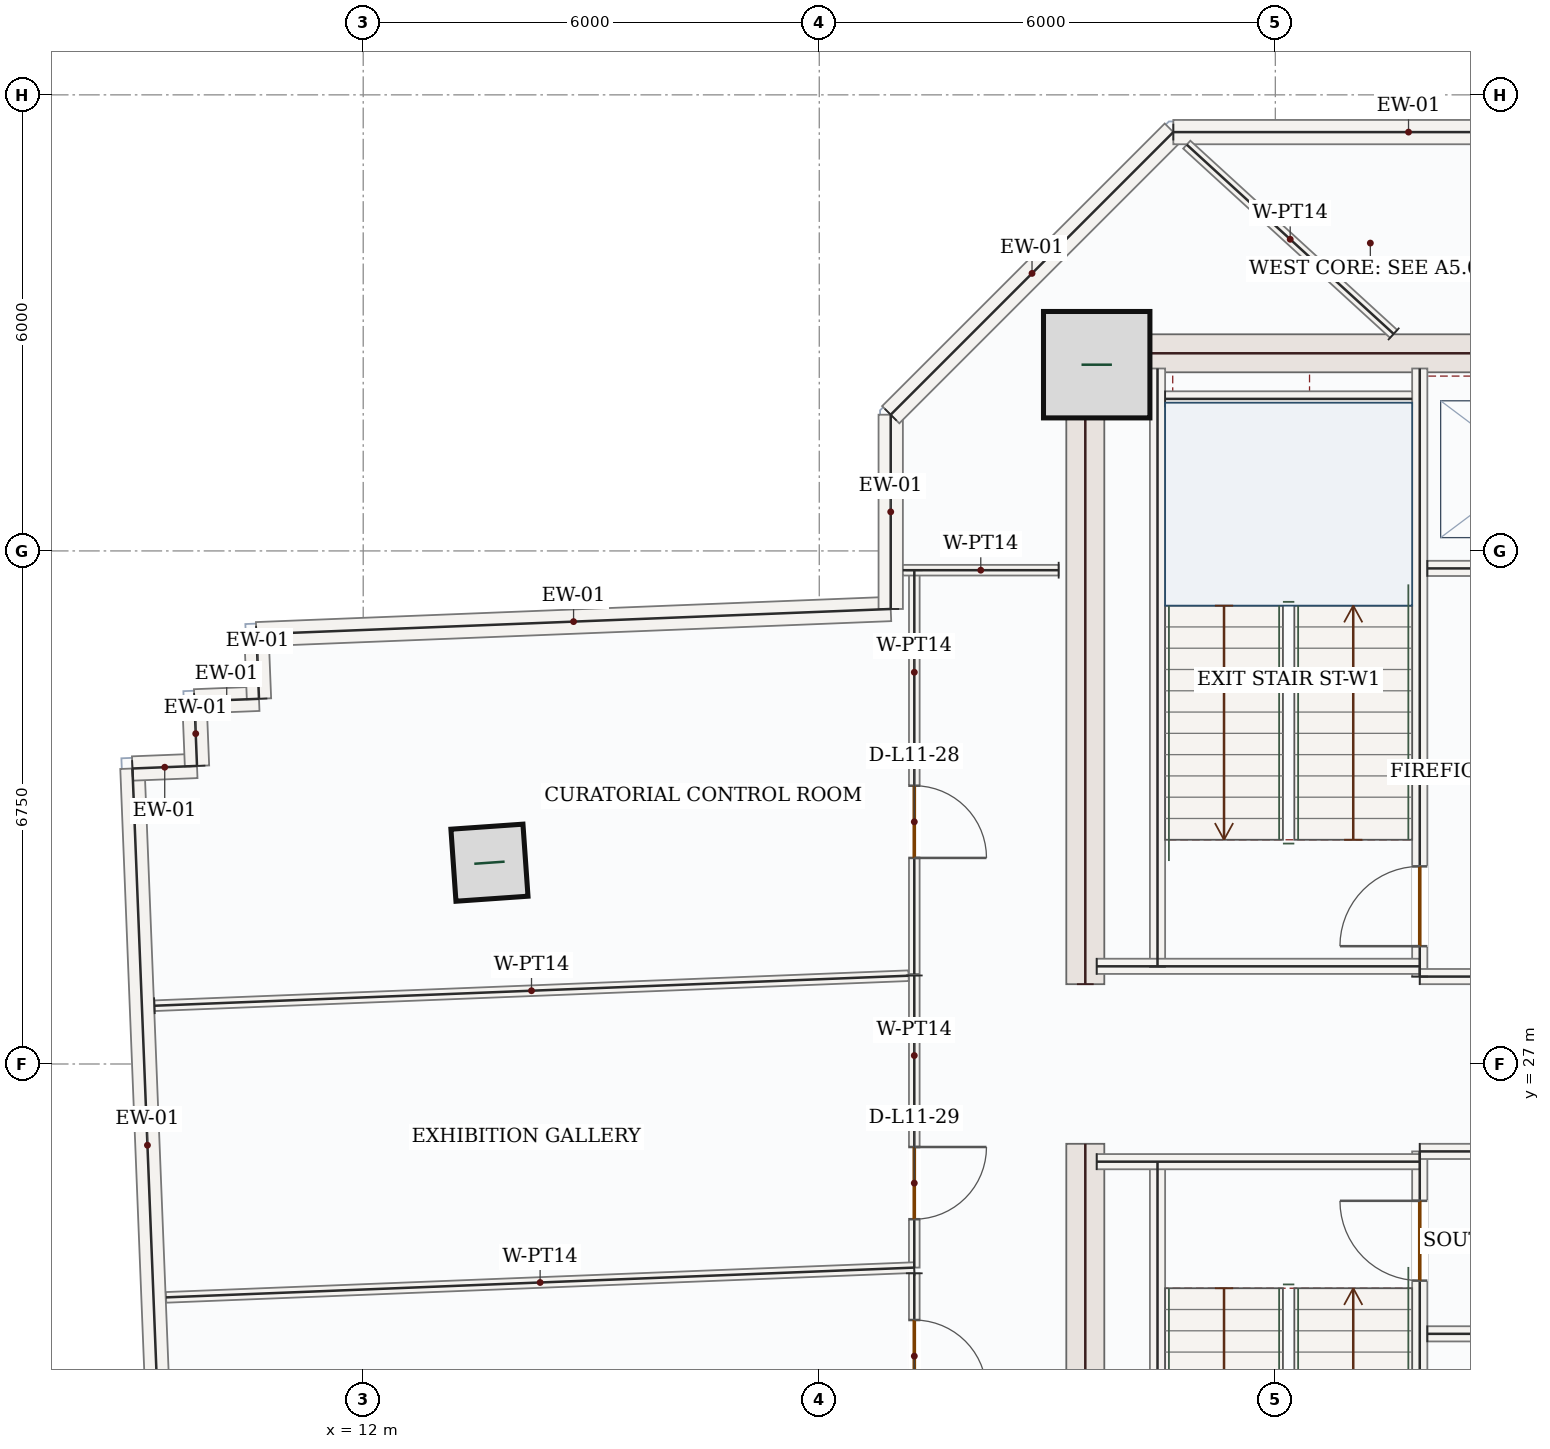
"""IFC4 building model, lengths in metres.
Left out: names, types, materials, properties, quantities, classifications, styles, units other than length and angle.
Written with IfcOpenShell. Run it as: python <this file> out.ifc"""

import sys

from ifc_helpers import new_model, si_unit, direction, frame, frame_2d, origin, origin_2d, place, context, subcontext, project, spatial, rectangle, hollow_rectangle, extrude, source, transform, mapped, element, fill, save


model = new_model("IFC4")
c1 = context("Model", 3, precision=1e-05, world=origin(), true_north=direction((0.0, 1.0)))
c2 = subcontext(c1, "Body", "Model", "MODEL_VIEW")
j1 = project(units=[si_unit("LENGTHUNIT", "METRE"), si_unit("PLANEANGLEUNIT", "RADIAN")], contexts=[c1])
p1 = place(None, origin())
s1 = spatial("IfcSite", under=j1, at=p1, CompositionType="ELEMENT")
p2 = place(p1, origin())
s2 = spatial("IfcBuilding", under=s1, at=p2, CompositionType="ELEMENT")
p3 = place(p2, frame((0.0, 0.0, 54.3)))
s3 = spatial("IfcBuildingStorey", under=s2, at=p3, CompositionType="ELEMENT", Elevation=54.3)
m1 = source(origin(), c2, "Body", "SweptSolid", [
    extrude(rectangle(XDim=8.55, YDim=0.5, at=frame_2d((4.275, 0.0))), origin(), (0.0, 0.0, 1.0), 3.95),
])
for number, where, z_axis, x_axis in (
    (1, (21.5, 17.4, 0.0), (0.0, 0.0, 1.0), (0.0, 1.0, 0.0)),
    (2, (21.5, 28.05, 0.0), (0.0, 0.0, 1.0), (0.0, 1.0, 0.0)),
):
    element("IfcWall", number, at=place(p3, frame(where, z_axis=z_axis, x_axis=x_axis)), inside=s3, PredefinedType="SHEAR", context=c2, shape_type="MappedRepresentation", body=[
        mapped(m1, transform((0.0, 0.0, 0.0), x_axis=(1.0, 0.0, 0.0), y_axis=(0.0, 1.0, 0.0), z_axis=(0.0, 0.0, 1.0), scale=1.0)),
    ])
m2 = source(origin(), c2, "Body", "SweptSolid", [
    extrude(rectangle(XDim=7.0, YDim=0.5, at=frame_2d((3.5, 0.0))), origin(), (0.0, 0.0, 1.0), 3.95),
])
p4 = place(p3, frame((21.75, 36.35, 0.0), z_axis=(0.0, 0.0, 1.0), x_axis=(1.0, 0.0, 0.0)))
e3 = element("IfcWall", 3, at=p4, inside=s3, PredefinedType="SHEAR", context=c2, shape_type="MappedRepresentation", body=[
    mapped(m2, transform((0.0, 0.0, 0.0), x_axis=(1.0, 0.0, 0.0), y_axis=(0.0, 1.0, 0.0), z_axis=(0.0, 0.0, 1.0), scale=1.0)),
])
m3 = source(origin(), c2, "Body", "SweptSolid", [
    extrude(rectangle(XDim=1.4, YDim=1.4, at=origin_2d()), origin(), (0.0, 0.0, 1.0), 4.2),
])
p5 = place(p3, frame((21.65, 36.2, 0.0), z_axis=(0.0, 0.0, 1.0), x_axis=(1.0, 0.0, 0.0)))
e4 = element("IfcColumn", 4, at=p5, inside=s3, PredefinedType="COLUMN", context=c2, shape_type="MappedRepresentation", body=[
    mapped(m3, transform((0.0, 0.0, 0.0), x_axis=(1.0, 0.0, 0.0), y_axis=(0.0, 1.0, 0.0), z_axis=(0.0, 0.0, 1.0), scale=1.0)),
])
m4 = source(origin(), c2, "Body", "SweptSolid", [
    extrude(hollow_rectangle(XDim=0.95, YDim=0.95, WallThickness=0.05, at=origin_2d()), origin(), (0.0, 0.0, 1.0), 4.2),
])
p6 = place(p3, frame((13.661, 29.648, 0.0), z_axis=(0.0, 0.0, 1.0), x_axis=(0.99756405026, 0.069756473744, 0.0)))
e5 = element("IfcColumn", 5, at=p6, inside=s3, PredefinedType="COLUMN", context=c2, shape_type="MappedRepresentation", body=[
    mapped(m4, transform((0.0, 0.0, 0.0), x_axis=(1.0, 0.0, 0.0), y_axis=(0.0, 1.0, 0.0), z_axis=(0.0, 0.0, 1.0), scale=1.0)),
])
m5 = source(origin(), c2, "Body", "SweptSolid", [
    extrude(rectangle(XDim=9.92, YDim=0.32, at=frame_2d((4.96, 0.0))), origin(), (0.0, 0.0, 1.0), 3.95),
])
p7 = place(p3, frame((9.359, 20.975, 0.0), z_axis=(0.0, 0.0, 1.0), x_axis=(-0.03977146366, 0.999208802342, 0.0)))
e6 = element("IfcWall", 6, at=p7, inside=s3, PredefinedType="SOLIDWALL", context=c2, shape_type="MappedRepresentation", body=[
    mapped(m5, transform((0.0, 0.0, 0.0), x_axis=(1.0, 0.0, 0.0), y_axis=(0.0, 1.0, 0.0), z_axis=(0.0, 0.0, 1.0), scale=1.0)),
])
m6 = source(origin(), c2, "Body", "SweptSolid", [
    extrude(rectangle(XDim=0.85, YDim=0.32, at=frame_2d((0.425, 0.0))), origin(), (0.0, 0.0, 1.0), 3.95),
])
p8 = place(p3, frame((8.964, 30.887, 0.0), z_axis=(0.0, 0.0, 1.0), x_axis=(0.999202334929, 0.039933618331, 0.0)))
e7 = element("IfcWall", 7, at=p8, inside=s3, PredefinedType="SOLIDWALL", context=c2, shape_type="MappedRepresentation", body=[
    mapped(m6, transform((0.0, 0.0, 0.0), x_axis=(1.0, 0.0, 0.0), y_axis=(0.0, 1.0, 0.0), z_axis=(0.0, 0.0, 1.0), scale=1.0)),
])
m7 = source(origin(), c2, "Body", "SweptSolid", [
    extrude(rectangle(XDim=0.85, YDim=0.32, at=frame_2d((0.425, 0.0))), origin(), (0.0, 0.0, 1.0), 3.95),
])
for number, where, z_axis, x_axis in (
    (8, (9.813, 30.921, 0.0), (0.0, 0.0, 1.0), (-0.04, 0.999, 0.0)),
    (9, (9.78, 31.771, 0.0), (0.0, 0.0, 1.0), (0.999, 0.04, 0.0)),
    (10, (10.629, 31.804, 0.0), (0.0, 0.0, 1.0), (-0.04, 0.999, 0.0)),
):
    element("IfcWall", number, at=place(p3, frame(where, z_axis=z_axis, x_axis=x_axis)), inside=s3, PredefinedType="SOLIDWALL", context=c2, shape_type="MappedRepresentation", body=[
        mapped(m7, transform((0.0, 0.0, 0.0), x_axis=(1.0, 0.0, 0.0), y_axis=(0.0, 1.0, 0.0), z_axis=(0.0, 0.0, 1.0), scale=1.0)),
    ])
m8 = source(origin(), c2, "Body", "SweptSolid", [
    extrude(rectangle(XDim=8.352, YDim=0.32, at=frame_2d((4.176, 0.0))), origin(), (0.0, 0.0, 1.0), 3.95),
])
p9 = place(p3, frame((10.595, 32.654, 0.0), z_axis=(0.0, 0.0, 1.0), x_axis=(0.999208226989, 0.039785916063, 0.0)))
e11 = element("IfcWall", 11, at=p9, inside=s3, PredefinedType="SOLIDWALL", context=c2, shape_type="MappedRepresentation", body=[
    mapped(m8, transform((0.0, 0.0, 0.0), x_axis=(1.0, 0.0, 0.0), y_axis=(0.0, 1.0, 0.0), z_axis=(0.0, 0.0, 1.0), scale=1.0)),
])
m9 = source(origin(), c2, "Body", "SweptSolid", [
    extrude(rectangle(XDim=2.556, YDim=0.32, at=frame_2d((1.278, 0.0))), origin(), (0.0, 0.0, 1.0), 3.95),
])
p10 = place(p3, frame((18.94, 32.986, 0.0), z_axis=(0.0, 0.0, 1.0), x_axis=(0.0, 1.0, 0.0)))
e12 = element("IfcWall", 12, at=p10, inside=s3, PredefinedType="SOLIDWALL", context=c2, shape_type="MappedRepresentation", body=[
    mapped(m9, transform((0.0, 0.0, 0.0), x_axis=(1.0, 0.0, 0.0), y_axis=(0.0, 1.0, 0.0), z_axis=(0.0, 0.0, 1.0), scale=1.0)),
])
m10 = source(origin(), c2, "Body", "SweptSolid", [
    extrude(rectangle(XDim=5.258, YDim=0.32, at=frame_2d((2.629, 0.0))), origin(), (0.0, 0.0, 1.0), 3.95),
])
p11 = place(p3, frame((18.94, 35.542, 0.0), z_axis=(0.0, 0.0, 1.0), x_axis=(0.707106781187, 0.707106781187, 0.0)))
e13 = element("IfcWall", 13, at=p11, inside=s3, PredefinedType="SOLIDWALL", context=c2, shape_type="MappedRepresentation", body=[
    mapped(m10, transform((0.0, 0.0, 0.0), x_axis=(1.0, 0.0, 0.0), y_axis=(0.0, 1.0, 0.0), z_axis=(0.0, 0.0, 1.0), scale=1.0)),
])
m11 = source(origin(), c2, "Body", "SweptSolid", [
    extrude(rectangle(XDim=6.189, YDim=0.32, at=frame_2d((3.094, 0.0))), origin(), (0.0, 0.0, 1.0), 3.95),
])
p12 = place(p3, frame((22.658, 39.26, 0.0), z_axis=(0.0, 0.0, 1.0), x_axis=(1.0, 0.0, 0.0)))
e14 = element("IfcWall", 14, at=p12, inside=s3, PredefinedType="SOLIDWALL", context=c2, shape_type="MappedRepresentation", body=[
    mapped(m11, transform((0.0, 0.0, 0.0), x_axis=(1.0, 0.0, 0.0), y_axis=(0.0, 1.0, 0.0), z_axis=(0.0, 0.0, 1.0), scale=1.0)),
])
m12 = source(origin(), c2, "Body", "SweptSolid", [
    extrude(rectangle(XDim=7.87, YDim=0.2, at=frame_2d((3.935, 0.0))), origin(), (0.0, 0.0, 1.0), 3.95),
])
for number, where, z_axis, x_axis in (
    (15, (22.45, 17.85, 0.0), (0.0, 0.0, 1.0), (0.0, 1.0, 0.0)),
    (16, (22.45, 28.28, 0.0), (0.0, 0.0, 1.0), (0.0, 1.0, 0.0)),
):
    element("IfcWall", number, at=place(p3, frame(where, z_axis=z_axis, x_axis=x_axis)), inside=s3, PredefinedType="SOLIDWALL", context=c2, shape_type="MappedRepresentation", body=[
        mapped(m12, transform((0.0, 0.0, 0.0), x_axis=(1.0, 0.0, 0.0), y_axis=(0.0, 1.0, 0.0), z_axis=(0.0, 0.0, 1.0), scale=1.0)),
    ])
p13 = place(p3, frame((25.9, 17.85, 0.0), z_axis=(0.0, 0.0, 1.0), x_axis=(0.0, 1.0, 0.0)))
e17 = element("IfcWall", 17, at=p13, inside=s3, PredefinedType="SOLIDWALL", context=c2, shape_type="SweptSolid", body=[
    extrude(rectangle(XDim=8.0, YDim=0.2, at=frame_2d((4.0, 0.0))), origin(), (0.0, 0.0, 1.0), 3.95),
])
p14 = place(p13, frame((6.3, 0.0, 0.0)))
e18 = element("IfcOpeningElement", 18, at=p14, cuts=e17, PredefinedType="OPENING", context=c2, shape_type="SweptSolid", body=[
    extrude(rectangle(XDim=1.05, YDim=2.15, at=frame_2d((0.525, 1.075))), frame((0.0, 0.11, 0.0), z_axis=(0.0, -1.0, 0.0), x_axis=(1.0, 0.0, 0.0)), (0.0, 0.0, 1.0), 0.22),
])
p15 = place(p3, frame((25.9, 28.15, 0.0), z_axis=(0.0, 0.0, 1.0), x_axis=(0.0, 1.0, 0.0)))
e19 = element("IfcWall", 19, at=p15, inside=s3, PredefinedType="SOLIDWALL", context=c2, shape_type="SweptSolid", body=[
    extrude(rectangle(XDim=8.0, YDim=0.2, at=frame_2d((4.0, 0.0))), origin(), (0.0, 0.0, 1.0), 3.95),
])
p16 = place(p15, frame((0.4, 0.0, 0.0)))
e20 = element("IfcOpeningElement", 20, at=p16, cuts=e19, PredefinedType="OPENING", context=c2, shape_type="SweptSolid", body=[
    extrude(rectangle(XDim=1.05, YDim=2.15, at=frame_2d((0.525, 1.075))), frame((0.0, 0.11, 0.0), z_axis=(0.0, -1.0, 0.0), x_axis=(1.0, 0.0, 0.0)), (0.0, 0.0, 1.0), 0.22),
])
m13 = source(origin(), c2, "Body", "SweptSolid", [
    extrude(rectangle(XDim=4.25, YDim=0.2, at=frame_2d((2.125, 0.0))), origin(), (0.0, 0.0, 1.0), 3.95),
])
p17 = place(p3, frame((21.65, 25.715, 0.0), z_axis=(0.0, 0.0, 1.0), x_axis=(1.0, 0.0, 0.0)))
e21 = element("IfcWall", 21, at=p17, inside=s3, PredefinedType="SOLIDWALL", context=c2, shape_type="MappedRepresentation", body=[
    mapped(m13, transform((0.0, 0.0, 0.0), x_axis=(1.0, 0.0, 0.0), y_axis=(0.0, 1.0, 0.0), z_axis=(0.0, 0.0, 1.0), scale=1.0)),
])
m14 = source(origin(), c2, "Body", "SweptSolid", [
    extrude(rectangle(XDim=3.0, YDim=0.2, at=frame_2d((1.5, 0.0))), origin(), (0.0, 0.0, 1.0), 3.95),
])
p18 = place(p3, frame((25.9, 25.85, 0.0), z_axis=(0.0, 0.0, 1.0), x_axis=(1.0, 0.0, 0.0)))
e22 = element("IfcWall", 22, at=p18, inside=s3, PredefinedType="SOLIDWALL", context=c2, shape_type="MappedRepresentation", body=[
    mapped(m14, transform((0.0, 0.0, 0.0), x_axis=(1.0, 0.0, 0.0), y_axis=(0.0, 1.0, 0.0), z_axis=(0.0, 0.0, 1.0), scale=1.0)),
])
p19 = place(p3, frame((21.65, 28.285, 0.0), z_axis=(0.0, 0.0, 1.0), x_axis=(1.0, 0.0, 0.0)))
e23 = element("IfcWall", 23, at=p19, inside=s3, PredefinedType="SOLIDWALL", context=c2, shape_type="MappedRepresentation", body=[
    mapped(m13, transform((0.0, 0.0, 0.0), x_axis=(1.0, 0.0, 0.0), y_axis=(0.0, 1.0, 0.0), z_axis=(0.0, 0.0, 1.0), scale=1.0)),
])
p20 = place(p3, frame((25.9, 28.15, 0.0), z_axis=(0.0, 0.0, 1.0), x_axis=(1.0, 0.0, 0.0)))
e24 = element("IfcWall", 24, at=p20, inside=s3, PredefinedType="SOLIDWALL", context=c2, shape_type="MappedRepresentation", body=[
    mapped(m14, transform((0.0, 0.0, 0.0), x_axis=(1.0, 0.0, 0.0), y_axis=(0.0, 1.0, 0.0), z_axis=(0.0, 0.0, 1.0), scale=1.0)),
])
m15 = source(origin(), c2, "Body", "SweptSolid", [
    extrude(rectangle(XDim=3.25, YDim=0.2, at=frame_2d((1.625, 0.0))), origin(), (0.0, 0.0, 1.0), 3.95),
])
p21 = place(p3, frame((22.55, 35.75, 0.0), z_axis=(0.0, 0.0, 1.0), x_axis=(1.0, 0.0, 0.0)))
e25 = element("IfcWall", 25, at=p21, inside=s3, PredefinedType="SOLIDWALL", context=c2, shape_type="MappedRepresentation", body=[
    mapped(m15, transform((0.0, 0.0, 0.0), x_axis=(1.0, 0.0, 0.0), y_axis=(0.0, 1.0, 0.0), z_axis=(0.0, 0.0, 1.0), scale=1.0)),
])
p22 = place(p3, frame((26.0, 33.52, 0.0), z_axis=(0.0, 0.0, 1.0), x_axis=(1.0, 0.0, 0.0)))
e26 = element("IfcWall", 26, at=p22, inside=s3, PredefinedType="SOLIDWALL", context=c2, shape_type="SweptSolid", body=[
    extrude(rectangle(XDim=2.75, YDim=0.2, at=frame_2d((1.375, 0.0))), origin(), (0.0, 0.0, 1.0), 3.95),
])
p23 = place(p22, frame((0.82, 0.0, 0.0)))
e27 = element("IfcOpeningElement", 27, at=p23, cuts=e26, PredefinedType="OPENING", context=c2, shape_type="SweptSolid", body=[
    extrude(rectangle(XDim=1.1, YDim=2.15, at=frame_2d((0.55, 1.075))), frame((0.0, 0.11, 0.0), z_axis=(0.0, -1.0, 0.0), x_axis=(1.0, 0.0, 0.0)), (0.0, 0.0, 1.0), 0.22),
])
m16 = source(origin(), c2, "Body", "SweptSolid", [
    extrude(rectangle(XDim=2.75, YDim=0.2, at=frame_2d((1.375, 0.0))), origin(), (0.0, 0.0, 1.0), 3.95),
])
p24 = place(p3, frame((26.0, 23.45, 0.0), z_axis=(0.0, 0.0, 1.0), x_axis=(1.0, 0.0, 0.0)))
e28 = element("IfcWall", 28, at=p24, inside=s3, PredefinedType="SOLIDWALL", context=c2, shape_type="MappedRepresentation", body=[
    mapped(m16, transform((0.0, 0.0, 0.0), x_axis=(1.0, 0.0, 0.0), y_axis=(0.0, 1.0, 0.0), z_axis=(0.0, 0.0, 1.0), scale=1.0)),
])
p25 = place(p3, frame((19.25, 28.165, 0.0), z_axis=(0.0, 0.0, 1.0), x_axis=(0.0, -1.0, 0.0)))
e29 = element("IfcWall", 29, at=p25, inside=s3, PredefinedType="PARTITIONING", context=c2, shape_type="SweptSolid", body=[
    extrude(rectangle(XDim=3.843, YDim=0.14, at=frame_2d((1.921, 0.0))), origin(), (0.0, 0.0, 1.0), 3.95),
])
p26 = place(p25, frame((2.257, 0.0, 0.0)))
e30 = element("IfcOpeningElement", 30, at=p26, cuts=e29, PredefinedType="OPENING", context=c2, shape_type="SweptSolid", body=[
    extrude(rectangle(XDim=0.95, YDim=2.15, at=frame_2d((0.475, 1.075))), frame((0.0, 0.08, 0.0), z_axis=(0.0, -1.0, 0.0), x_axis=(1.0, 0.0, 0.0)), (0.0, 0.0, 1.0), 0.16),
])
m17 = source(origin(), c2, "Body", "SweptSolid", [
    extrude(rectangle(XDim=9.851, YDim=0.14, at=frame_2d((4.925, 0.0))), origin(), (0.0, 0.0, 1.0), 3.95),
])
p27 = place(p3, frame((19.249, 24.322, 0.0), z_axis=(0.0, 0.0, 1.0), x_axis=(-0.999208542072, -0.039778002084, 0.0)))
e31 = element("IfcWall", 31, at=p27, inside=s3, PredefinedType="PARTITIONING", context=c2, shape_type="MappedRepresentation", body=[
    mapped(m17, transform((0.0, 0.0, 0.0), x_axis=(1.0, 0.0, 0.0), y_axis=(0.0, 1.0, 0.0), z_axis=(0.0, 0.0, 1.0), scale=1.0)),
])
m18 = source(origin(), c2, "Body", "SweptSolid", [
    extrude(rectangle(XDim=9.929, YDim=0.14, at=frame_2d((4.965, 0.0))), origin(), (0.0, 0.0, 1.0), 3.95),
])
p28 = place(p3, frame((9.253, 27.767, 0.0), z_axis=(0.0, 0.0, 1.0), x_axis=(0.999208364847, 0.039782453661, 0.0)))
e32 = element("IfcWall", 32, at=p28, inside=s3, PredefinedType="PARTITIONING", context=c2, shape_type="MappedRepresentation", body=[
    mapped(m18, transform((0.0, 0.0, 0.0), x_axis=(1.0, 0.0, 0.0), y_axis=(0.0, 1.0, 0.0), z_axis=(0.0, 0.0, 1.0), scale=1.0)),
])
m19 = source(origin(), c2, "Body", "SweptSolid", [
    extrude(rectangle(XDim=3.689, YDim=0.14, at=frame_2d((1.844, 0.0))), origin(), (0.0, 0.0, 1.0), 3.95),
])
p29 = place(p3, frame((25.557, 36.605, 0.0), z_axis=(0.0, 0.0, 1.0), x_axis=(-0.737843279395, 0.674972069831, 0.0)))
e33 = element("IfcWall", 33, at=p29, inside=s3, PredefinedType="PARTITIONING", context=c2, shape_type="MappedRepresentation", body=[
    mapped(m19, transform((0.0, 0.0, 0.0), x_axis=(1.0, 0.0, 0.0), y_axis=(0.0, 1.0, 0.0), z_axis=(0.0, 0.0, 1.0), scale=1.0)),
])
p30 = place(p3, frame((19.25, 33.496, 0.0), z_axis=(0.0, 0.0, 1.0), x_axis=(-9.1924438e-05, -0.999999995775, 0.0)))
e34 = element("IfcWall", 34, at=p30, inside=s3, PredefinedType="PARTITIONING", context=c2, shape_type="SweptSolid", body=[
    extrude(rectangle(XDim=5.312, YDim=0.14, at=frame_2d((2.656, 0.0))), origin(), (0.0, 0.0, 1.0), 3.95),
])
p31 = place(p30, frame((2.835, 0.0, 0.0)))
e35 = element("IfcOpeningElement", 35, at=p31, cuts=e34, PredefinedType="OPENING", context=c2, shape_type="SweptSolid", body=[
    extrude(rectangle(XDim=0.95, YDim=2.15, at=frame_2d((0.475, 1.075))), frame((0.0, 0.08, 0.0), z_axis=(0.0, -1.0, 0.0), x_axis=(1.0, 0.0, 0.0)), (0.0, 0.0, 1.0), 0.16),
])
m20 = source(origin(), c2, "Body", "SweptSolid", [
    extrude(rectangle(XDim=2.049, YDim=0.14, at=frame_2d((1.025, 0.0))), origin(), (0.0, 0.0, 1.0), 3.95),
])
p32 = place(p3, frame((21.149, 33.497, 0.0), z_axis=(0.0, 0.0, 1.0), x_axis=(-0.999999992904, -0.000119132713, 0.0)))
e36 = element("IfcWall", 36, at=p32, inside=s3, PredefinedType="PARTITIONING", context=c2, shape_type="MappedRepresentation", body=[
    mapped(m20, transform((0.0, 0.0, 0.0), x_axis=(1.0, 0.0, 0.0), y_axis=(0.0, 1.0, 0.0), z_axis=(0.0, 0.0, 1.0), scale=1.0)),
])
p33 = place(p3, frame((19.25, 24.247, 0.0), z_axis=(0.0, 0.0, 1.0), x_axis=(0.000326008981, -0.999999946859, 0.0)))
e37 = element("IfcWall", 37, at=p33, inside=s3, PredefinedType="PARTITIONING", context=c2, shape_type="SweptSolid", body=[
    extrude(rectangle(XDim=3.744, YDim=0.14, at=frame_2d((1.872, 0.0))), origin(), (0.0, 0.0, 1.0), 3.95),
])
p34 = place(p33, frame((0.615, 0.0, 0.0)))
e38 = element("IfcOpeningElement", 38, at=p34, cuts=e37, PredefinedType="OPENING", context=c2, shape_type="SweptSolid", body=[
    extrude(rectangle(XDim=0.95, YDim=2.15, at=frame_2d((0.475, 1.075))), frame((0.0, 0.08, 0.0), z_axis=(0.0, -1.0, 0.0), x_axis=(1.0, 0.0, 0.0)), (0.0, 0.0, 1.0), 0.16),
])
m21 = source(origin(), c2, "Body", "SweptSolid", [
    extrude(rectangle(XDim=1.05, YDim=2.15, at=frame_2d((0.525, 1.075))), frame((0.0, 0.025, 0.0), z_axis=(0.0, -1.0, 0.0), x_axis=(1.0, 0.0, 0.0)), (0.0, 0.0, 1.0), 0.05),
])
p35 = place(p16, origin())
e39 = element("IfcDoor", 39, at=p35, inside=s3, OperationType="SINGLE_SWING_LEFT", PredefinedType="DOOR", context=c2, shape_type="MappedRepresentation", body=[
    mapped(m21, transform((0.0, 0.0, 0.0), x_axis=(1.0, 0.0, 0.0), y_axis=(0.0, 1.0, 0.0), z_axis=(0.0, 0.0, 1.0), scale=1.0)),
])
fill(e20, e39)
p36 = place(p14, origin())
e40 = element("IfcDoor", 40, at=p36, inside=s3, OperationType="SINGLE_SWING_RIGHT", PredefinedType="DOOR", context=c2, shape_type="MappedRepresentation", body=[
    mapped(m21, transform((0.0, 0.0, 0.0), x_axis=(1.0, 0.0, 0.0), y_axis=(0.0, 1.0, 0.0), z_axis=(0.0, 0.0, 1.0), scale=1.0)),
])
fill(e18, e40)
m22 = source(origin(), c2, "Body", "SweptSolid", [
    extrude(rectangle(XDim=0.95, YDim=2.15, at=frame_2d((0.475, 1.075))), frame((0.0, 0.025, 0.0), z_axis=(0.0, -1.0, 0.0), x_axis=(1.0, 0.0, 0.0)), (0.0, 0.0, 1.0), 0.05),
])
p37 = place(p31, origin())
e41 = element("IfcDoor", 41, at=p37, inside=s3, OperationType="SINGLE_SWING_RIGHT", PredefinedType="DOOR", context=c2, shape_type="MappedRepresentation", body=[
    mapped(m22, transform((0.0, 0.0, 0.0), x_axis=(1.0, 0.0, 0.0), y_axis=(0.0, 1.0, 0.0), z_axis=(0.0, 0.0, 1.0), scale=1.0)),
])
fill(e35, e41)
p38 = place(p26, origin())
e42 = element("IfcDoor", 42, at=p38, inside=s3, OperationType="SINGLE_SWING_LEFT", PredefinedType="DOOR", context=c2, shape_type="MappedRepresentation", body=[
    mapped(m22, transform((0.0, 0.0, 0.0), x_axis=(1.0, 0.0, 0.0), y_axis=(0.0, 1.0, 0.0), z_axis=(0.0, 0.0, 1.0), scale=1.0)),
])
fill(e30, e42)
p39 = place(p34, origin())
e43 = element("IfcDoor", 43, at=p39, inside=s3, OperationType="SINGLE_SWING_RIGHT", PredefinedType="DOOR", context=c2, shape_type="MappedRepresentation", body=[
    mapped(m22, transform((0.0, 0.0, 0.0), x_axis=(1.0, 0.0, 0.0), y_axis=(0.0, 1.0, 0.0), z_axis=(0.0, 0.0, 1.0), scale=1.0)),
])
fill(e38, e43)
save(model, sys.argv[1])
